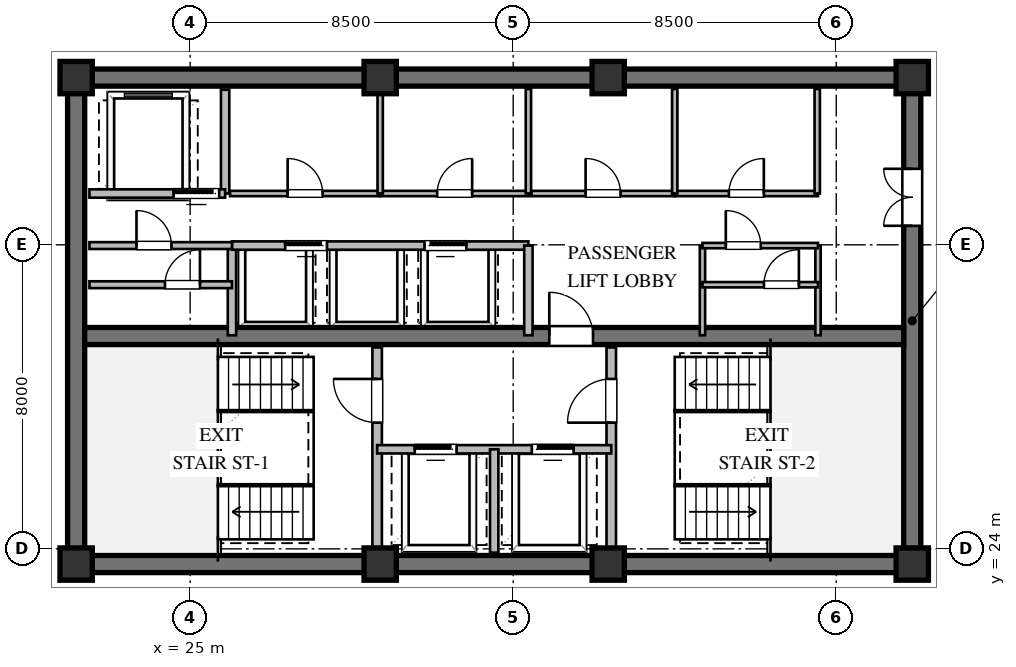
"""IFC4 building model, lengths in metres.
Left out: names, types, materials, properties, quantities, classifications, styles, units other than length and angle.
Written with IfcOpenShell. Run it as: python <this file> out.ifc"""

import sys

from ifc_helpers import new_model, si_unit, direction, frame, frame_2d, origin, origin_2d, place, context, subcontext, project, spatial, rectangle, extrude, element, fill, save


model = new_model("IFC4")
c1 = context("Model", 3, precision=1e-05, world=origin(), true_north=direction((0.0, 1.0)))
c2 = subcontext(c1, "Body", "Model", "MODEL_VIEW")
j1 = project(units=[si_unit("LENGTHUNIT", "METRE"), si_unit("PLANEANGLEUNIT", "RADIAN")], contexts=[c1])
p1 = place(None, origin())
s1 = spatial("IfcSite", under=j1, at=p1, CompositionType="ELEMENT")
p2 = place(p1, origin())
s2 = spatial("IfcBuilding", under=s1, at=p2, CompositionType="ELEMENT")
p3 = place(p2, frame((0.0, 0.0, 242.4)))
s3 = spatial("IfcBuildingStorey", under=s2, at=p3, CompositionType="ELEMENT", Elevation=242.4)
for number, where, z_axis, x_axis in (
    (1, (21.775, 23.6, 0.0), (0.0, 0.0, 1.0), (1.0, 0.0, 0.0)),
    (2, (21.775, 36.4, 0.0), (0.0, 0.0, 1.0), (1.0, 0.0, 0.0)),
):
    element("IfcWall", number, at=place(p3, frame(where, z_axis=z_axis, x_axis=x_axis)), inside=s3, PredefinedType="SHEAR", context=c2, shape_type="SweptSolid", body=[
        extrude(rectangle(XDim=22.45, YDim=0.45, at=frame_2d((11.225, 0.0))), origin(), (0.0, 0.0, 1.0), 3.36),
    ])
p4 = place(p3, frame((22.0, 23.825, 0.0), z_axis=(0.0, 0.0, 1.0), x_axis=(0.0, 1.0, 0.0)))
e3 = element("IfcWall", 3, at=p4, inside=s3, PredefinedType="SHEAR", context=c2, shape_type="SweptSolid", body=[
    extrude(rectangle(XDim=12.35, YDim=0.45, at=frame_2d((6.175, 0.0))), origin(), (0.0, 0.0, 1.0), 3.36),
])
p5 = place(p3, frame((44.0, 23.825, 0.0), z_axis=(0.0, 0.0, 1.0), x_axis=(0.0, 1.0, 0.0)))
e4 = element("IfcWall", 4, at=p5, inside=s3, PredefinedType="SHEAR", context=c2, shape_type="SweptSolid", body=[
    extrude(rectangle(XDim=12.35, YDim=0.45, at=frame_2d((6.175, 0.0))), origin(), (0.0, 0.0, 1.0), 3.36),
])
p6 = place(p5, frame((8.675, 0.0, 0.0)))
e5 = element("IfcOpeningElement", 5, at=p6, cuts=e4, PredefinedType="OPENING", context=c2, shape_type="SweptSolid", body=[
    extrude(rectangle(XDim=1.5, YDim=2.15, at=frame_2d((0.75, 1.075))), frame((0.0, 0.235, 0.0), z_axis=(0.0, -1.0, 0.0), x_axis=(1.0, 0.0, 0.0)), (0.0, 0.0, 1.0), 0.47),
])
p7 = place(p3, frame((22.225, 29.6, 0.0), z_axis=(0.0, 0.0, 1.0), x_axis=(1.0, 0.0, 0.0)))
e6 = element("IfcWall", 6, at=p7, inside=s3, PredefinedType="SHEAR", context=c2, shape_type="SweptSolid", body=[
    extrude(rectangle(XDim=21.55, YDim=0.45, at=frame_2d((10.775, 0.0))), origin(), (0.0, 0.0, 1.0), 3.36),
])
p8 = place(p7, frame((12.225, 0.0, 0.0)))
e7 = element("IfcOpeningElement", 7, at=p8, cuts=e6, PredefinedType="OPENING", context=c2, shape_type="SweptSolid", body=[
    extrude(rectangle(XDim=1.15, YDim=2.1, at=frame_2d((0.575, 1.05))), frame((0.0, 0.235, 0.0), z_axis=(0.0, -1.0, 0.0), x_axis=(1.0, 0.0, 0.0)), (0.0, 0.0, 1.0), 0.47),
])
for number, where, z_axis, x_axis in (
    (8, (22.0, 23.6, 0.0), (0.0, 0.0, 1.0), (1.0, 0.0, 0.0)),
    (9, (30.0, 23.6, 0.0), (0.0, 0.0, 1.0), (1.0, 0.0, 0.0)),
    (10, (36.0, 23.6, 0.0), (0.0, 0.0, 1.0), (1.0, 0.0, 0.0)),
    (11, (44.0, 23.6, 0.0), (0.0, 0.0, 1.0), (1.0, 0.0, 0.0)),
    (12, (44.0, 36.4, 0.0), (0.0, 0.0, 1.0), (1.0, 0.0, 0.0)),
    (13, (36.0, 36.4, 0.0), (0.0, 0.0, 1.0), (1.0, 0.0, 0.0)),
    (14, (30.0, 36.4, 0.0), (0.0, 0.0, 1.0), (1.0, 0.0, 0.0)),
    (15, (22.0, 36.4, 0.0), (0.0, 0.0, 1.0), (1.0, 0.0, 0.0)),
):
    element("IfcColumn", number, at=place(p3, frame(where, z_axis=z_axis, x_axis=x_axis)), inside=s3, PredefinedType="COLUMN", context=c2, shape_type="SweptSolid", body=[
        extrude(rectangle(XDim=0.85, YDim=0.85, at=origin_2d()), origin(), (0.0, 0.0, 1.0), 3.6),
    ])
p9 = place(p3, frame((29.92, 23.9, 0.0), z_axis=(0.0, 0.0, 1.0), x_axis=(0.0, 1.0, 0.0)))
e16 = element("IfcWall", 16, at=p9, inside=s3, PredefinedType="SOLIDWALL", context=c2, shape_type="SweptSolid", body=[
    extrude(rectangle(XDim=5.4, YDim=0.25, at=frame_2d((2.7, 0.0))), origin(), (0.0, 0.0, 1.0), 3.36),
])
p10 = place(p9, frame((3.421, 0.0, 0.0)))
e17 = element("IfcOpeningElement", 17, at=p10, cuts=e16, PredefinedType="OPENING", context=c2, shape_type="SweptSolid", body=[
    extrude(rectangle(XDim=1.15, YDim=2.1, at=frame_2d((0.575, 1.05))), frame((0.0, 0.135, 0.0), z_axis=(0.0, -1.0, 0.0), x_axis=(1.0, 0.0, 0.0)), (0.0, 0.0, 1.0), 0.27),
])
p11 = place(p3, frame((36.08, 23.9, 0.0), z_axis=(0.0, 0.0, 1.0), x_axis=(0.0, 1.0, 0.0)))
e18 = element("IfcWall", 18, at=p11, inside=s3, PredefinedType="SOLIDWALL", context=c2, shape_type="SweptSolid", body=[
    extrude(rectangle(XDim=5.4, YDim=0.25, at=frame_2d((2.7, 0.0))), origin(), (0.0, 0.0, 1.0), 3.36),
])
p12 = place(p11, frame((3.421, 0.0, 0.0)))
e19 = element("IfcOpeningElement", 19, at=p12, cuts=e18, PredefinedType="OPENING", context=c2, shape_type="SweptSolid", body=[
    extrude(rectangle(XDim=1.15, YDim=2.1, at=frame_2d((0.575, 1.05))), frame((0.0, 0.135, 0.0), z_axis=(0.0, -1.0, 0.0), x_axis=(1.0, 0.0, 0.0)), (0.0, 0.0, 1.0), 0.27),
])
p13 = place(p3, frame((29.92, 26.62, 0.0), z_axis=(0.0, 0.0, 1.0), x_axis=(1.0, 0.0, 0.0)))
e20 = element("IfcWall", 20, at=p13, inside=s3, PredefinedType="SOLIDWALL", context=c2, shape_type="SweptSolid", body=[
    extrude(rectangle(XDim=6.16, YDim=0.22, at=frame_2d((3.08, 0.0))), origin(), (0.0, 0.0, 1.0), 3.36),
])
p14 = place(p13, frame((0.99, 0.0, 0.0)))
e21 = element("IfcOpeningElement", 21, at=p14, cuts=e20, PredefinedType="OPENING", context=c2, shape_type="SweptSolid", body=[
    extrude(rectangle(XDim=1.1, YDim=2.1, at=frame_2d((0.55, 1.05))), frame((0.0, 0.12, 0.0), z_axis=(0.0, -1.0, 0.0), x_axis=(1.0, 0.0, 0.0)), (0.0, 0.0, 1.0), 0.24),
])
p15 = place(p13, frame((4.07, 0.0, 0.0)))
e22 = element("IfcOpeningElement", 22, at=p15, cuts=e20, PredefinedType="OPENING", context=c2, shape_type="SweptSolid", body=[
    extrude(rectangle(XDim=1.1, YDim=2.1, at=frame_2d((0.55, 1.05))), frame((0.0, 0.12, 0.0), z_axis=(0.0, -1.0, 0.0), x_axis=(1.0, 0.0, 0.0)), (0.0, 0.0, 1.0), 0.24),
])
p16 = place(p3, frame((33.0, 23.9, 0.0), z_axis=(0.0, 0.0, 1.0), x_axis=(0.0, 1.0, 0.0)))
e23 = element("IfcWall", 23, at=p16, inside=s3, PredefinedType="SOLIDWALL", context=c2, shape_type="SweptSolid", body=[
    extrude(rectangle(XDim=2.72, YDim=0.22, at=frame_2d((1.36, 0.0))), origin(), (0.0, 0.0, 1.0), 3.36),
])
p17 = place(p3, frame((25.92, 33.35, 0.0), z_axis=(0.0, 0.0, 1.0), x_axis=(0.0, 1.0, 0.0)))
e24 = element("IfcWall", 24, at=p17, inside=s3, PredefinedType="SOLIDWALL", context=c2, shape_type="SweptSolid", body=[
    extrude(rectangle(XDim=2.73, YDim=0.22, at=frame_2d((1.365, 0.0))), origin(), (0.0, 0.0, 1.0), 3.36),
])
p18 = place(p3, frame((22.35, 33.35, 0.0), z_axis=(0.0, 0.0, 1.0), x_axis=(1.0, 0.0, 0.0)))
e25 = element("IfcWall", 25, at=p18, inside=s3, PredefinedType="SOLIDWALL", context=c2, shape_type="SweptSolid", body=[
    extrude(rectangle(XDim=3.57, YDim=0.22, at=frame_2d((1.785, 0.0))), origin(), (0.0, 0.0, 1.0), 3.36),
])
p19 = place(p18, frame((2.213, 0.0, 0.0)))
e26 = element("IfcOpeningElement", 26, at=p19, cuts=e25, PredefinedType="OPENING", context=c2, shape_type="SweptSolid", body=[
    extrude(rectangle(XDim=1.2, YDim=2.1, at=frame_2d((0.6, 1.05))), frame((0.0, 0.12, 0.0), z_axis=(0.0, -1.0, 0.0), x_axis=(1.0, 0.0, 0.0)), (0.0, 0.0, 1.0), 0.24),
])
p20 = place(p3, frame((26.1, 29.62, 0.0), z_axis=(0.0, 0.0, 1.0), x_axis=(0.0, 1.0, 0.0)))
e27 = element("IfcWall", 27, at=p20, inside=s3, PredefinedType="SOLIDWALL", context=c2, shape_type="SweptSolid", body=[
    extrude(rectangle(XDim=2.36, YDim=0.22, at=frame_2d((1.18, 0.0))), origin(), (0.0, 0.0, 1.0), 3.36),
])
p21 = place(p3, frame((26.1, 31.98, 0.0), z_axis=(0.0, 0.0, 1.0), x_axis=(1.0, 0.0, 0.0)))
e28 = element("IfcWall", 28, at=p21, inside=s3, PredefinedType="SOLIDWALL", context=c2, shape_type="SweptSolid", body=[
    extrude(rectangle(XDim=7.8, YDim=0.22, at=frame_2d((3.9, 0.0))), origin(), (0.0, 0.0, 1.0), 3.36),
])
p22 = place(p21, frame((1.4, 0.0, 0.0)))
e29 = element("IfcOpeningElement", 29, at=p22, cuts=e28, PredefinedType="OPENING", context=c2, shape_type="SweptSolid", body=[
    extrude(rectangle(XDim=1.1, YDim=2.1, at=frame_2d((0.55, 1.05))), frame((0.0, 0.12, 0.0), z_axis=(0.0, -1.0, 0.0), x_axis=(1.0, 0.0, 0.0)), (0.0, 0.0, 1.0), 0.24),
])
p23 = place(p21, frame((5.066, 0.0, 0.0)))
e30 = element("IfcOpeningElement", 30, at=p23, cuts=e28, PredefinedType="OPENING", context=c2, shape_type="SweptSolid", body=[
    extrude(rectangle(XDim=1.1, YDim=2.1, at=frame_2d((0.55, 1.05))), frame((0.0, 0.12, 0.0), z_axis=(0.0, -1.0, 0.0), x_axis=(1.0, 0.0, 0.0)), (0.0, 0.0, 1.0), 0.24),
])
p24 = place(p3, frame((33.9, 29.62, 0.0), z_axis=(0.0, 0.0, 1.0), x_axis=(0.0, 1.0, 0.0)))
e31 = element("IfcWall", 31, at=p24, inside=s3, PredefinedType="SOLIDWALL", context=c2, shape_type="SweptSolid", body=[
    extrude(rectangle(XDim=2.36, YDim=0.22, at=frame_2d((1.18, 0.0))), origin(), (0.0, 0.0, 1.0), 3.36),
])
p25 = place(p3, frame((26.05, 33.35, 0.0), z_axis=(0.0, 0.0, 1.0), x_axis=(1.0, 0.0, 0.0)))
e32 = element("IfcWall", 32, at=p25, inside=s3, PredefinedType="PARTITIONING", context=c2, shape_type="SweptSolid", body=[
    extrude(rectangle(XDim=3.95, YDim=0.14, at=frame_2d((1.975, 0.0))), origin(), (0.0, 0.0, 1.0), 3.36),
])
p26 = place(p25, frame((1.515, 0.0, 0.0)))
e33 = element("IfcOpeningElement", 33, at=p26, cuts=e32, PredefinedType="OPENING", context=c2, shape_type="SweptSolid", body=[
    extrude(rectangle(XDim=0.92, YDim=2.1, at=frame_2d((0.46, 1.05))), frame((0.0, 0.08, 0.0), z_axis=(0.0, -1.0, 0.0), x_axis=(1.0, 0.0, 0.0)), (0.0, 0.0, 1.0), 0.16),
])
p27 = place(p3, frame((30.0, 33.35, 0.0), z_axis=(0.0, 0.0, 1.0), x_axis=(1.0, 0.0, 0.0)))
e34 = element("IfcWall", 34, at=p27, inside=s3, PredefinedType="PARTITIONING", context=c2, shape_type="SweptSolid", body=[
    extrude(rectangle(XDim=3.92, YDim=0.14, at=frame_2d((1.96, 0.0))), origin(), (0.0, 0.0, 1.0), 3.36),
])
p28 = place(p27, frame((1.5, 0.0, 0.0)))
e35 = element("IfcOpeningElement", 35, at=p28, cuts=e34, PredefinedType="OPENING", context=c2, shape_type="SweptSolid", body=[
    extrude(rectangle(XDim=0.92, YDim=2.1, at=frame_2d((0.46, 1.05))), frame((0.0, 0.08, 0.0), z_axis=(0.0, -1.0, 0.0), x_axis=(1.0, 0.0, 0.0)), (0.0, 0.0, 1.0), 0.16),
])
for number, where, z_axis, x_axis in (
    (36, (30.0, 33.35, 0.0), (0.0, 0.0, 1.0), (0.0, 1.0, 0.0)),
    (37, (33.9, 33.35, 0.0), (0.0, 0.0, 1.0), (0.0, 1.0, 0.0)),
):
    element("IfcWall", number, at=place(p3, frame(where, z_axis=z_axis, x_axis=x_axis)), inside=s3, PredefinedType="PARTITIONING", context=c2, shape_type="SweptSolid", body=[
        extrude(rectangle(XDim=2.75, YDim=0.14, at=frame_2d((1.375, 0.0))), origin(), (0.0, 0.0, 1.0), 3.36),
    ])
p29 = place(p3, frame((33.98, 33.35, 0.0), z_axis=(0.0, 0.0, 1.0), x_axis=(1.0, 0.0, 0.0)))
e38 = element("IfcWall", 38, at=p29, inside=s3, PredefinedType="PARTITIONING", context=c2, shape_type="SweptSolid", body=[
    extrude(rectangle(XDim=3.77, YDim=0.14, at=frame_2d((1.885, 0.0))), origin(), (0.0, 0.0, 1.0), 3.36),
])
p30 = place(p29, frame((1.425, 0.0, 0.0)))
e39 = element("IfcOpeningElement", 39, at=p30, cuts=e38, PredefinedType="OPENING", context=c2, shape_type="SweptSolid", body=[
    extrude(rectangle(XDim=0.92, YDim=2.1, at=frame_2d((0.46, 1.05))), frame((0.0, 0.08, 0.0), z_axis=(0.0, -1.0, 0.0), x_axis=(1.0, 0.0, 0.0)), (0.0, 0.0, 1.0), 0.16),
])
p31 = place(p3, frame((37.75, 33.35, 0.0), z_axis=(0.0, 0.0, 1.0), x_axis=(1.0, 0.0, 0.0)))
e40 = element("IfcWall", 40, at=p31, inside=s3, PredefinedType="PARTITIONING", context=c2, shape_type="SweptSolid", body=[
    extrude(rectangle(XDim=3.77, YDim=0.14, at=frame_2d((1.885, 0.0))), origin(), (0.0, 0.0, 1.0), 3.36),
])
p32 = place(p31, frame((1.425, 0.0, 0.0)))
e41 = element("IfcOpeningElement", 41, at=p32, cuts=e40, PredefinedType="OPENING", context=c2, shape_type="SweptSolid", body=[
    extrude(rectangle(XDim=0.92, YDim=2.1, at=frame_2d((0.46, 1.05))), frame((0.0, 0.08, 0.0), z_axis=(0.0, -1.0, 0.0), x_axis=(1.0, 0.0, 0.0)), (0.0, 0.0, 1.0), 0.16),
])
for number, where, z_axis, x_axis in (
    (42, (37.75, 33.35, 0.0), (0.0, 0.0, 1.0), (0.0, 1.0, 0.0)),
    (43, (41.5, 33.35, 0.0), (0.0, 0.0, 1.0), (0.0, 1.0, 0.0)),
):
    element("IfcWall", number, at=place(p3, frame(where, z_axis=z_axis, x_axis=x_axis)), inside=s3, PredefinedType="PARTITIONING", context=c2, shape_type="SweptSolid", body=[
        extrude(rectangle(XDim=2.75, YDim=0.14, at=frame_2d((1.375, 0.0))), origin(), (0.0, 0.0, 1.0), 3.36),
    ])
p33 = place(p3, frame((22.35, 30.95, 0.0), z_axis=(0.0, 0.0, 1.0), x_axis=(1.0, 0.0, 0.0)))
e44 = element("IfcWall", 44, at=p33, inside=s3, PredefinedType="PARTITIONING", context=c2, shape_type="SweptSolid", body=[
    extrude(rectangle(XDim=3.75, YDim=0.18, at=frame_2d((1.875, 0.0))), origin(), (0.0, 0.0, 1.0), 3.36),
])
p34 = place(p33, frame((1.988, 0.0, 0.0)))
e45 = element("IfcOpeningElement", 45, at=p34, cuts=e44, PredefinedType="OPENING", context=c2, shape_type="SweptSolid", body=[
    extrude(rectangle(XDim=0.92, YDim=2.1, at=frame_2d((0.46, 1.05))), frame((0.0, 0.1, 0.0), z_axis=(0.0, -1.0, 0.0), x_axis=(1.0, 0.0, 0.0)), (0.0, 0.0, 1.0), 0.2),
])
p35 = place(p3, frame((22.35, 31.98, 0.0), z_axis=(0.0, 0.0, 1.0), x_axis=(1.0, 0.0, 0.0)))
e46 = element("IfcWall", 46, at=p35, inside=s3, PredefinedType="PARTITIONING", context=c2, shape_type="SweptSolid", body=[
    extrude(rectangle(XDim=3.75, YDim=0.18, at=frame_2d((1.875, 0.0))), origin(), (0.0, 0.0, 1.0), 3.36),
])
p36 = place(p35, frame((1.238, 0.0, 0.0)))
e47 = element("IfcOpeningElement", 47, at=p36, cuts=e46, PredefinedType="OPENING", context=c2, shape_type="SweptSolid", body=[
    extrude(rectangle(XDim=0.92, YDim=2.1, at=frame_2d((0.46, 1.05))), frame((0.0, 0.1, 0.0), z_axis=(0.0, -1.0, 0.0), x_axis=(1.0, 0.0, 0.0)), (0.0, 0.0, 1.0), 0.2),
])
for number, where, z_axis, x_axis in (
    (48, (38.48, 29.62, 0.0), (0.0, 0.0, 1.0), (0.0, 1.0, 0.0)),
    (49, (41.52, 29.62, 0.0), (0.0, 0.0, 1.0), (0.0, 1.0, 0.0)),
):
    element("IfcWall", number, at=place(p3, frame(where, z_axis=z_axis, x_axis=x_axis)), inside=s3, PredefinedType="PARTITIONING", context=c2, shape_type="SweptSolid", body=[
        extrude(rectangle(XDim=2.36, YDim=0.14, at=frame_2d((1.18, 0.0))), origin(), (0.0, 0.0, 1.0), 3.36),
    ])
p37 = place(p3, frame((38.48, 30.95, 0.0), z_axis=(0.0, 0.0, 1.0), x_axis=(1.0, 0.0, 0.0)))
e50 = element("IfcWall", 50, at=p37, inside=s3, PredefinedType="PARTITIONING", context=c2, shape_type="SweptSolid", body=[
    extrude(rectangle(XDim=3.04, YDim=0.14, at=frame_2d((1.52, 0.0))), origin(), (0.0, 0.0, 1.0), 3.36),
])
p38 = place(p37, frame((1.617, 0.0, 0.0)))
e51 = element("IfcOpeningElement", 51, at=p38, cuts=e50, PredefinedType="OPENING", context=c2, shape_type="SweptSolid", body=[
    extrude(rectangle(XDim=0.92, YDim=2.1, at=frame_2d((0.46, 1.05))), frame((0.0, 0.08, 0.0), z_axis=(0.0, -1.0, 0.0), x_axis=(1.0, 0.0, 0.0)), (0.0, 0.0, 1.0), 0.16),
])
p39 = place(p3, frame((38.48, 31.98, 0.0), z_axis=(0.0, 0.0, 1.0), x_axis=(1.0, 0.0, 0.0)))
e52 = element("IfcWall", 52, at=p39, inside=s3, PredefinedType="PARTITIONING", context=c2, shape_type="SweptSolid", body=[
    extrude(rectangle(XDim=3.04, YDim=0.14, at=frame_2d((1.52, 0.0))), origin(), (0.0, 0.0, 1.0), 3.36),
])
p40 = place(p39, frame((0.614, 0.0, 0.0)))
e53 = element("IfcOpeningElement", 53, at=p40, cuts=e52, PredefinedType="OPENING", context=c2, shape_type="SweptSolid", body=[
    extrude(rectangle(XDim=0.92, YDim=2.1, at=frame_2d((0.46, 1.05))), frame((0.0, 0.08, 0.0), z_axis=(0.0, -1.0, 0.0), x_axis=(1.0, 0.0, 0.0)), (0.0, 0.0, 1.0), 0.16),
])
p41 = place(p10, origin())
e54 = element("IfcDoor", 54, at=p41, inside=s3, OperationType="SINGLE_SWING_RIGHT", PredefinedType="DOOR", context=c2, shape_type="SweptSolid", body=[
    extrude(rectangle(XDim=1.15, YDim=2.1, at=frame_2d((0.575, 1.05))), frame((0.0, 0.025, 0.0), z_axis=(0.0, -1.0, 0.0), x_axis=(1.0, 0.0, 0.0)), (0.0, 0.0, 1.0), 0.05),
])
fill(e17, e54)
p42 = place(p12, origin())
e55 = element("IfcDoor", 55, at=p42, inside=s3, OperationType="SINGLE_SWING_LEFT", PredefinedType="DOOR", context=c2, shape_type="SweptSolid", body=[
    extrude(rectangle(XDim=1.15, YDim=2.1, at=frame_2d((0.575, 1.05))), frame((0.0, 0.025, 0.0), z_axis=(0.0, -1.0, 0.0), x_axis=(1.0, 0.0, 0.0)), (0.0, 0.0, 1.0), 0.05),
])
fill(e19, e55)
p43 = place(p14, origin())
e56 = element("IfcDoor", 56, at=p43, inside=s3, OperationType="SLIDING_TO_LEFT", PredefinedType="DOOR", context=c2, shape_type="SweptSolid", body=[
    extrude(rectangle(XDim=1.1, YDim=2.1, at=frame_2d((0.55, 1.05))), frame((0.0, 0.025, 0.0), z_axis=(0.0, -1.0, 0.0), x_axis=(1.0, 0.0, 0.0)), (0.0, 0.0, 1.0), 0.05),
])
fill(e21, e56)
p44 = place(p15, origin())
e57 = element("IfcDoor", 57, at=p44, inside=s3, OperationType="SLIDING_TO_RIGHT", PredefinedType="DOOR", context=c2, shape_type="SweptSolid", body=[
    extrude(rectangle(XDim=1.1, YDim=2.1, at=frame_2d((0.55, 1.05))), frame((0.0, 0.025, 0.0), z_axis=(0.0, -1.0, 0.0), x_axis=(1.0, 0.0, 0.0)), (0.0, 0.0, 1.0), 0.05),
])
fill(e22, e57)
p45 = place(p8, origin())
e58 = element("IfcDoor", 58, at=p45, inside=s3, OperationType="SINGLE_SWING_LEFT", PredefinedType="DOOR", context=c2, shape_type="SweptSolid", body=[
    extrude(rectangle(XDim=1.15, YDim=2.1, at=frame_2d((0.575, 1.05))), frame((0.0, 0.025, 0.0), z_axis=(0.0, -1.0, 0.0), x_axis=(1.0, 0.0, 0.0)), (0.0, 0.0, 1.0), 0.05),
])
fill(e7, e58)
p46 = place(p6, origin())
e59 = element("IfcDoor", 59, at=p46, inside=s3, OperationType="DOUBLE_DOOR_SINGLE_SWING", PredefinedType="DOOR", context=c2, shape_type="SweptSolid", body=[
    extrude(rectangle(XDim=1.5, YDim=2.15, at=frame_2d((0.75, 1.075))), frame((0.0, 0.025, 0.0), z_axis=(0.0, -1.0, 0.0), x_axis=(1.0, 0.0, 0.0)), (0.0, 0.0, 1.0), 0.05),
])
fill(e5, e59)
p47 = place(p19, origin())
e60 = element("IfcDoor", 60, at=p47, inside=s3, OperationType="SLIDING_TO_LEFT", PredefinedType="DOOR", context=c2, shape_type="SweptSolid", body=[
    extrude(rectangle(XDim=1.2, YDim=2.1, at=frame_2d((0.6, 1.05))), frame((0.0, 0.025, 0.0), z_axis=(0.0, -1.0, 0.0), x_axis=(1.0, 0.0, 0.0)), (0.0, 0.0, 1.0), 0.05),
])
fill(e26, e60)
p48 = place(p22, origin())
e61 = element("IfcDoor", 61, at=p48, inside=s3, OperationType="SLIDING_TO_LEFT", PredefinedType="DOOR", context=c2, shape_type="SweptSolid", body=[
    extrude(rectangle(XDim=1.1, YDim=2.1, at=frame_2d((0.55, 1.05))), frame((0.0, 0.025, 0.0), z_axis=(0.0, -1.0, 0.0), x_axis=(1.0, 0.0, 0.0)), (0.0, 0.0, 1.0), 0.05),
])
fill(e29, e61)
p49 = place(p23, origin())
e62 = element("IfcDoor", 62, at=p49, inside=s3, OperationType="SLIDING_TO_RIGHT", PredefinedType="DOOR", context=c2, shape_type="SweptSolid", body=[
    extrude(rectangle(XDim=1.1, YDim=2.1, at=frame_2d((0.55, 1.05))), frame((0.0, 0.025, 0.0), z_axis=(0.0, -1.0, 0.0), x_axis=(1.0, 0.0, 0.0)), (0.0, 0.0, 1.0), 0.05),
])
fill(e30, e62)
p50 = place(p26, origin())
e63 = element("IfcDoor", 63, at=p50, inside=s3, OperationType="SINGLE_SWING_LEFT", PredefinedType="DOOR", context=c2, shape_type="SweptSolid", body=[
    extrude(rectangle(XDim=0.92, YDim=2.1, at=frame_2d((0.46, 1.05))), frame((0.0, 0.025, 0.0), z_axis=(0.0, -1.0, 0.0), x_axis=(1.0, 0.0, 0.0)), (0.0, 0.0, 1.0), 0.05),
])
fill(e33, e63)
p51 = place(p28, origin())
e64 = element("IfcDoor", 64, at=p51, inside=s3, OperationType="SINGLE_SWING_RIGHT", PredefinedType="DOOR", context=c2, shape_type="SweptSolid", body=[
    extrude(rectangle(XDim=0.92, YDim=2.1, at=frame_2d((0.46, 1.05))), frame((0.0, 0.025, 0.0), z_axis=(0.0, -1.0, 0.0), x_axis=(1.0, 0.0, 0.0)), (0.0, 0.0, 1.0), 0.05),
])
fill(e35, e64)
p52 = place(p30, origin())
e65 = element("IfcDoor", 65, at=p52, inside=s3, OperationType="SINGLE_SWING_LEFT", PredefinedType="DOOR", context=c2, shape_type="SweptSolid", body=[
    extrude(rectangle(XDim=0.92, YDim=2.1, at=frame_2d((0.46, 1.05))), frame((0.0, 0.025, 0.0), z_axis=(0.0, -1.0, 0.0), x_axis=(1.0, 0.0, 0.0)), (0.0, 0.0, 1.0), 0.05),
])
fill(e39, e65)
p53 = place(p32, origin())
e66 = element("IfcDoor", 66, at=p53, inside=s3, OperationType="SINGLE_SWING_RIGHT", PredefinedType="DOOR", context=c2, shape_type="SweptSolid", body=[
    extrude(rectangle(XDim=0.92, YDim=2.1, at=frame_2d((0.46, 1.05))), frame((0.0, 0.025, 0.0), z_axis=(0.0, -1.0, 0.0), x_axis=(1.0, 0.0, 0.0)), (0.0, 0.0, 1.0), 0.05),
])
fill(e41, e66)
p54 = place(p36, origin())
e67 = element("IfcDoor", 67, at=p54, inside=s3, OperationType="SINGLE_SWING_LEFT", PredefinedType="DOOR", context=c2, shape_type="SweptSolid", body=[
    extrude(rectangle(XDim=0.92, YDim=2.1, at=frame_2d((0.46, 1.05))), frame((0.0, 0.025, 0.0), z_axis=(0.0, -1.0, 0.0), x_axis=(1.0, 0.0, 0.0)), (0.0, 0.0, 1.0), 0.05),
])
fill(e47, e67)
p55 = place(p34, origin())
e68 = element("IfcDoor", 68, at=p55, inside=s3, OperationType="SINGLE_SWING_RIGHT", PredefinedType="DOOR", context=c2, shape_type="SweptSolid", body=[
    extrude(rectangle(XDim=0.92, YDim=2.1, at=frame_2d((0.46, 1.05))), frame((0.0, 0.025, 0.0), z_axis=(0.0, -1.0, 0.0), x_axis=(1.0, 0.0, 0.0)), (0.0, 0.0, 1.0), 0.05),
])
fill(e45, e68)
p56 = place(p40, origin())
e69 = element("IfcDoor", 69, at=p56, inside=s3, OperationType="SINGLE_SWING_LEFT", PredefinedType="DOOR", context=c2, shape_type="SweptSolid", body=[
    extrude(rectangle(XDim=0.92, YDim=2.1, at=frame_2d((0.46, 1.05))), frame((0.0, 0.025, 0.0), z_axis=(0.0, -1.0, 0.0), x_axis=(1.0, 0.0, 0.0)), (0.0, 0.0, 1.0), 0.05),
])
fill(e53, e69)
p57 = place(p38, origin())
e70 = element("IfcDoor", 70, at=p57, inside=s3, OperationType="SINGLE_SWING_RIGHT", PredefinedType="DOOR", context=c2, shape_type="SweptSolid", body=[
    extrude(rectangle(XDim=0.92, YDim=2.1, at=frame_2d((0.46, 1.05))), frame((0.0, 0.025, 0.0), z_axis=(0.0, -1.0, 0.0), x_axis=(1.0, 0.0, 0.0)), (0.0, 0.0, 1.0), 0.05),
])
fill(e51, e70)
save(model, sys.argv[1])
